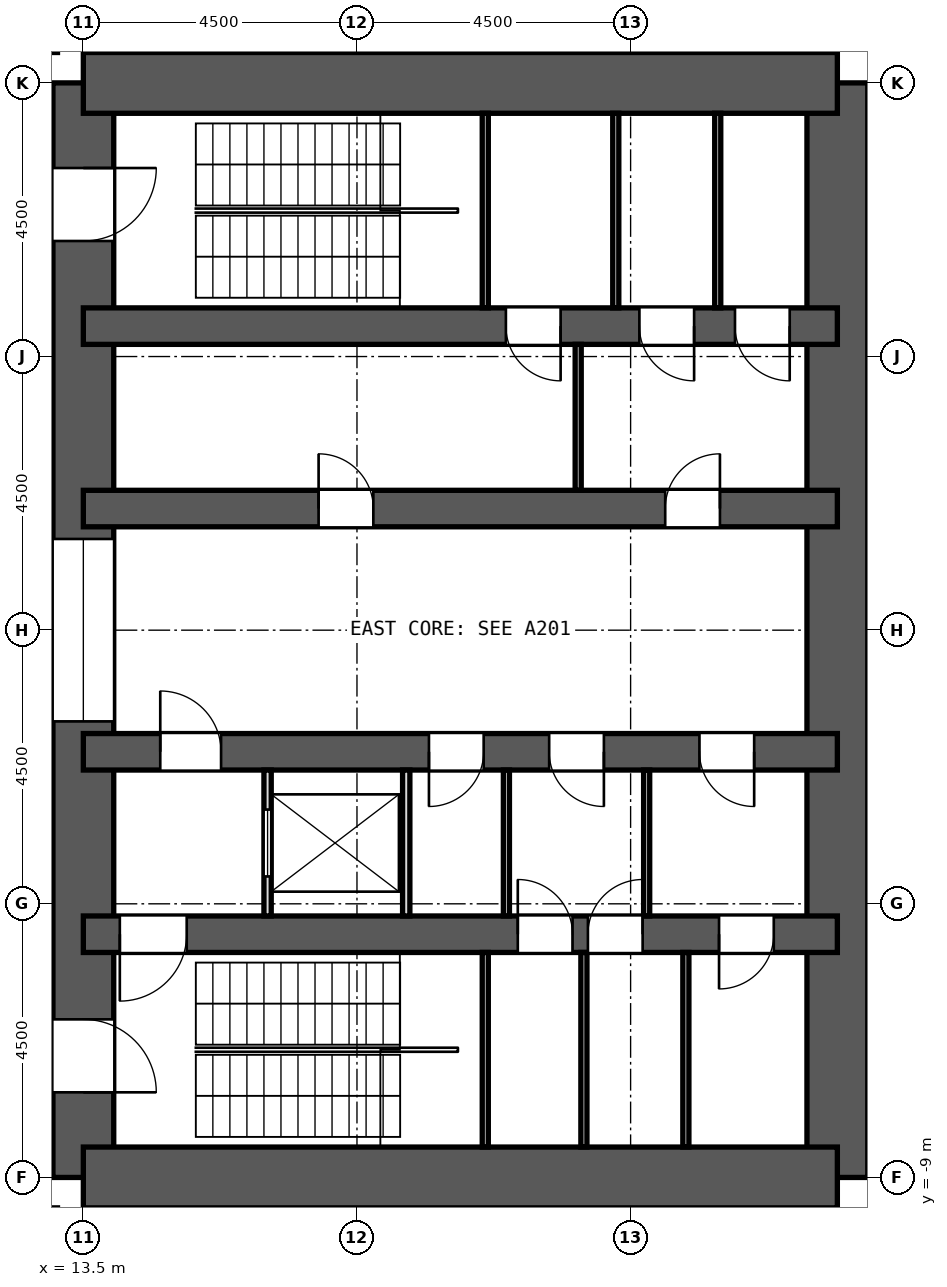
"""IFC4 building model, lengths in metres.
Left out: names, types, materials, properties, quantities, classifications, styles, units other than length and angle.
Written with IfcOpenShell. Run it as: python <this file> out.ifc"""

import sys

from ifc_helpers import new_model, si_unit, direction, frame, frame_2d, origin, place, context, subcontext, project, spatial, rectangle, extrude, element, fill, save


model = new_model("IFC4")
c1 = context("Model", 3, precision=1e-05, world=origin(), true_north=direction((0.0, 1.0)))
c2 = subcontext(c1, "Body", "Model", "MODEL_VIEW")
j1 = project(units=[si_unit("LENGTHUNIT", "METRE"), si_unit("PLANEANGLEUNIT", "RADIAN")], contexts=[c1])
p1 = place(None, origin())
s1 = spatial("IfcSite", under=j1, at=p1, CompositionType="ELEMENT")
p2 = place(p1, origin())
s2 = spatial("IfcBuilding", under=s1, at=p2, CompositionType="ELEMENT")
p3 = place(p2, frame((0.0, 0.0, -9.0)))
s3 = spatial("IfcBuildingStorey", under=s2, at=p3, CompositionType="ELEMENT", Elevation=-9.0)
p4 = place(p3, frame((13.5, -9.0, -0.3), z_axis=(0.0, 0.0, 1.0), x_axis=(0.0, 1.0, 0.0)))
e1 = element("IfcWall", 1, at=p4, inside=s3, PredefinedType="SHEAR", context=c2, shape_type="SweptSolid", body=[
    extrude(rectangle(XDim=18.0, YDim=1.0, at=frame_2d((9.0, 0.0))), origin(), (0.0, 0.0, 1.0), 4.8),
])
p5 = place(p4, frame((15.4, 0.0, 0.3)))
e2 = element("IfcOpeningElement", 2, at=p5, cuts=e1, PredefinedType="OPENING", context=c2, shape_type="SweptSolid", body=[
    extrude(rectangle(XDim=1.2, YDim=2.1, at=frame_2d((0.6, 1.05))), frame((0.0, 0.512, 0.0), z_axis=(0.0, -1.0, 0.0), x_axis=(1.0, 0.0, 0.0)), (0.0, 0.0, 1.0), 1.024),
])
p6 = place(p4, frame((1.4, 0.0, 0.3)))
e3 = element("IfcOpeningElement", 3, at=p6, cuts=e1, PredefinedType="OPENING", context=c2, shape_type="SweptSolid", body=[
    extrude(rectangle(XDim=1.2, YDim=2.1, at=frame_2d((0.6, 1.05))), frame((0.0, 0.512, 0.0), z_axis=(0.0, -1.0, 0.0), x_axis=(1.0, 0.0, 0.0)), (0.0, 0.0, 1.0), 1.024),
])
p7 = place(p4, frame((7.5, 0.0, 0.3)))
e4 = element("IfcOpeningElement", 4, at=p7, cuts=e1, PredefinedType="OPENING", context=c2, shape_type="SweptSolid", body=[
    extrude(rectangle(XDim=3.0, YDim=2.4, at=frame_2d((1.5, 1.2))), frame((0.0, 0.512, 0.0), z_axis=(0.0, -1.0, 0.0), x_axis=(1.0, 0.0, 0.0)), (0.0, 0.0, 1.0), 1.024),
])
p8 = place(p3, frame((25.9, -9.0, -0.3), z_axis=(0.0, 0.0, 1.0), x_axis=(0.0, 1.0, 0.0)))
e5 = element("IfcWall", 5, at=p8, inside=s3, PredefinedType="SHEAR", context=c2, shape_type="SweptSolid", body=[
    extrude(rectangle(XDim=18.0, YDim=1.0, at=frame_2d((9.0, 0.0))), origin(), (0.0, 0.0, 1.0), 4.8),
])
for number, where, z_axis, x_axis in (
    (6, (13.5, 9.0, -0.3), (0.0, 0.0, 1.0), (1.0, 0.0, 0.0)),
    (7, (13.5, -9.0, -0.3), (0.0, 0.0, 1.0), (1.0, 0.0, 0.0)),
):
    element("IfcWall", number, at=place(p3, frame(where, z_axis=z_axis, x_axis=x_axis)), inside=s3, PredefinedType="SHEAR", context=c2, shape_type="SweptSolid", body=[
        extrude(rectangle(XDim=12.4, YDim=1.0, at=frame_2d((6.2, 0.0))), origin(), (0.0, 0.0, 1.0), 4.8),
    ])
p9 = place(p3, frame((13.5, 5.0, -0.3), z_axis=(0.0, 0.0, 1.0), x_axis=(1.0, 0.0, 0.0)))
e8 = element("IfcWall", 8, at=p9, inside=s3, PredefinedType="SHEAR", context=c2, shape_type="SweptSolid", body=[
    extrude(rectangle(XDim=12.4, YDim=0.6, at=frame_2d((6.2, 0.0))), origin(), (0.0, 0.0, 1.0), 4.8),
])
p10 = place(p9, frame((6.949, 0.0, 0.3)))
e9 = element("IfcOpeningElement", 9, at=p10, cuts=e8, PredefinedType="OPENING", context=c2, shape_type="SweptSolid", body=[
    extrude(rectangle(XDim=0.9, YDim=2.1, at=frame_2d((0.45, 1.05))), frame((0.0, 0.312, 0.0), z_axis=(0.0, -1.0, 0.0), x_axis=(1.0, 0.0, 0.0)), (0.0, 0.0, 1.0), 0.624),
])
p11 = place(p9, frame((9.144, 0.0, 0.3)))
e10 = element("IfcOpeningElement", 10, at=p11, cuts=e8, PredefinedType="OPENING", context=c2, shape_type="SweptSolid", body=[
    extrude(rectangle(XDim=0.9, YDim=2.1, at=frame_2d((0.45, 1.05))), frame((0.0, 0.312, 0.0), z_axis=(0.0, -1.0, 0.0), x_axis=(1.0, 0.0, 0.0)), (0.0, 0.0, 1.0), 0.624),
])
p12 = place(p9, frame((10.716, 0.0, 0.3)))
e11 = element("IfcOpeningElement", 11, at=p12, cuts=e8, PredefinedType="OPENING", context=c2, shape_type="SweptSolid", body=[
    extrude(rectangle(XDim=0.9, YDim=2.1, at=frame_2d((0.45, 1.05))), frame((0.0, 0.312, 0.0), z_axis=(0.0, -1.0, 0.0), x_axis=(1.0, 0.0, 0.0)), (0.0, 0.0, 1.0), 0.624),
])
p13 = place(p3, frame((13.5, -5.0, -0.3), z_axis=(0.0, 0.0, 1.0), x_axis=(1.0, 0.0, 0.0)))
e12 = element("IfcWall", 12, at=p13, inside=s3, PredefinedType="SHEAR", context=c2, shape_type="SweptSolid", body=[
    extrude(rectangle(XDim=12.4, YDim=0.6, at=frame_2d((6.2, 0.0))), origin(), (0.0, 0.0, 1.0), 4.8),
])
p14 = place(p13, frame((7.145, 0.0, 0.3)))
e13 = element("IfcOpeningElement", 13, at=p14, cuts=e12, PredefinedType="OPENING", context=c2, shape_type="SweptSolid", body=[
    extrude(rectangle(XDim=0.9, YDim=2.1, at=frame_2d((0.45, 1.05))), frame((0.0, 0.312, 0.0), z_axis=(0.0, -1.0, 0.0), x_axis=(1.0, 0.0, 0.0)), (0.0, 0.0, 1.0), 0.624),
])
p15 = place(p13, frame((8.298, 0.0, 0.3)))
e14 = element("IfcOpeningElement", 14, at=p15, cuts=e12, PredefinedType="OPENING", context=c2, shape_type="SweptSolid", body=[
    extrude(rectangle(XDim=0.9, YDim=2.1, at=frame_2d((0.45, 1.05))), frame((0.0, 0.312, 0.0), z_axis=(0.0, -1.0, 0.0), x_axis=(1.0, 0.0, 0.0)), (0.0, 0.0, 1.0), 0.624),
])
p16 = place(p13, frame((10.454, 0.0, 0.3)))
e15 = element("IfcOpeningElement", 15, at=p16, cuts=e12, PredefinedType="OPENING", context=c2, shape_type="SweptSolid", body=[
    extrude(rectangle(XDim=0.9, YDim=2.1, at=frame_2d((0.45, 1.05))), frame((0.0, 0.312, 0.0), z_axis=(0.0, -1.0, 0.0), x_axis=(1.0, 0.0, 0.0)), (0.0, 0.0, 1.0), 0.624),
])
p17 = place(p13, frame((0.6, 0.0, 0.3)))
e16 = element("IfcOpeningElement", 16, at=p17, cuts=e12, PredefinedType="OPENING", context=c2, shape_type="SweptSolid", body=[
    extrude(rectangle(XDim=1.1, YDim=2.1, at=frame_2d((0.55, 1.05))), frame((0.0, 0.312, 0.0), z_axis=(0.0, -1.0, 0.0), x_axis=(1.0, 0.0, 0.0)), (0.0, 0.0, 1.0), 0.624),
])
p18 = place(p3, frame((13.5, 2.0, -0.3), z_axis=(0.0, 0.0, 1.0), x_axis=(1.0, 0.0, 0.0)))
e17 = element("IfcWall", 17, at=p18, inside=s3, PredefinedType="SHEAR", context=c2, shape_type="SweptSolid", body=[
    extrude(rectangle(XDim=12.4, YDim=0.6, at=frame_2d((6.2, 0.0))), origin(), (0.0, 0.0, 1.0), 4.8),
])
p19 = place(p18, frame((3.869, 0.0, 0.3)))
e18 = element("IfcOpeningElement", 18, at=p19, cuts=e17, PredefinedType="OPENING", context=c2, shape_type="SweptSolid", body=[
    extrude(rectangle(XDim=0.9, YDim=2.1, at=frame_2d((0.45, 1.05))), frame((0.0, 0.312, 0.0), z_axis=(0.0, -1.0, 0.0), x_axis=(1.0, 0.0, 0.0)), (0.0, 0.0, 1.0), 0.624),
])
p20 = place(p18, frame((9.569, 0.0, 0.3)))
e19 = element("IfcOpeningElement", 19, at=p20, cuts=e17, PredefinedType="OPENING", context=c2, shape_type="SweptSolid", body=[
    extrude(rectangle(XDim=0.9, YDim=2.1, at=frame_2d((0.45, 1.05))), frame((0.0, 0.312, 0.0), z_axis=(0.0, -1.0, 0.0), x_axis=(1.0, 0.0, 0.0)), (0.0, 0.0, 1.0), 0.624),
])
p21 = place(p3, frame((13.5, -2.0, -0.3), z_axis=(0.0, 0.0, 1.0), x_axis=(1.0, 0.0, 0.0)))
e20 = element("IfcWall", 20, at=p21, inside=s3, PredefinedType="SHEAR", context=c2, shape_type="SweptSolid", body=[
    extrude(rectangle(XDim=12.4, YDim=0.6, at=frame_2d((6.2, 0.0))), origin(), (0.0, 0.0, 1.0), 4.8),
])
p22 = place(p21, frame((1.265, 0.0, 0.3)))
e21 = element("IfcOpeningElement", 21, at=p22, cuts=e20, PredefinedType="OPENING", context=c2, shape_type="SweptSolid", body=[
    extrude(rectangle(XDim=1.0, YDim=2.1, at=frame_2d((0.5, 1.05))), frame((0.0, 0.312, 0.0), z_axis=(0.0, -1.0, 0.0), x_axis=(1.0, 0.0, 0.0)), (0.0, 0.0, 1.0), 0.624),
])
p23 = place(p21, frame((5.684, 0.0, 0.3)))
e22 = element("IfcOpeningElement", 22, at=p23, cuts=e20, PredefinedType="OPENING", context=c2, shape_type="SweptSolid", body=[
    extrude(rectangle(XDim=0.9, YDim=2.1, at=frame_2d((0.45, 1.05))), frame((0.0, 0.312, 0.0), z_axis=(0.0, -1.0, 0.0), x_axis=(1.0, 0.0, 0.0)), (0.0, 0.0, 1.0), 0.624),
])
p24 = place(p21, frame((7.661, 0.0, 0.3)))
e23 = element("IfcOpeningElement", 23, at=p24, cuts=e20, PredefinedType="OPENING", context=c2, shape_type="SweptSolid", body=[
    extrude(rectangle(XDim=0.9, YDim=2.1, at=frame_2d((0.45, 1.05))), frame((0.0, 0.312, 0.0), z_axis=(0.0, -1.0, 0.0), x_axis=(1.0, 0.0, 0.0)), (0.0, 0.0, 1.0), 0.624),
])
p25 = place(p21, frame((10.132, 0.0, 0.3)))
e24 = element("IfcOpeningElement", 24, at=p25, cuts=e20, PredefinedType="OPENING", context=c2, shape_type="SweptSolid", body=[
    extrude(rectangle(XDim=0.9, YDim=2.1, at=frame_2d((0.45, 1.05))), frame((0.0, 0.312, 0.0), z_axis=(0.0, -1.0, 0.0), x_axis=(1.0, 0.0, 0.0)), (0.0, 0.0, 1.0), 0.624),
])
p26 = place(p3, frame((9.077, -9.077, 0.0), z_axis=(0.0, 0.0, 1.0), x_axis=(0.707106781187, -0.707106781187, 0.0)))
e25 = element("IfcWall", 25, at=p26, inside=s3, PredefinedType="PARTITIONING", context=c2, shape_type="SweptSolid", body=[
    extrude(rectangle(XDim=14.703, YDim=0.15, at=frame_2d((7.352, 0.0))), origin(), (0.0, 0.0, 1.0), 3.95),
])
p27 = place(p26, frame((1.966, 0.0, 0.0)))
e26 = element("IfcOpeningElement", 26, at=p27, cuts=e25, PredefinedType="OPENING", context=c2, shape_type="SweptSolid", body=[
    extrude(rectangle(XDim=0.9, YDim=2.1, at=frame_2d((0.45, 1.05))), frame((0.0, 0.087, 0.0), z_axis=(0.0, -1.0, 0.0), x_axis=(1.0, 0.0, 0.0)), (0.0, 0.0, 1.0), 0.174),
])
p28 = place(p3, frame((9.13, 9.13, 0.0), z_axis=(0.0, 0.0, 1.0), x_axis=(0.707106781187, 0.707106781187, 0.0)))
e27 = element("IfcWall", 27, at=p28, inside=s3, PredefinedType="PARTITIONING", context=c2, shape_type="SweptSolid", body=[
    extrude(rectangle(XDim=14.628, YDim=0.15, at=frame_2d((7.314, 0.0))), origin(), (0.0, 0.0, 1.0), 3.95),
])
p29 = place(p28, frame((2.201, 0.0, 0.0)))
e28 = element("IfcOpeningElement", 28, at=p29, cuts=e27, PredefinedType="OPENING", context=c2, shape_type="SweptSolid", body=[
    extrude(rectangle(XDim=1.0, YDim=2.1, at=frame_2d((0.5, 1.05))), frame((0.0, 0.087, 0.0), z_axis=(0.0, -1.0, 0.0), x_axis=(1.0, 0.0, 0.0)), (0.0, 0.0, 1.0), 0.174),
])
p30 = place(p3, frame((13.0, 9.5, 0.0), z_axis=(0.0, 0.0, 1.0), x_axis=(0.0, 1.0, 0.0)))
e29 = element("IfcWall", 29, at=p30, inside=s3, PredefinedType="PARTITIONING", context=c2, shape_type="SweptSolid", body=[
    extrude(rectangle(XDim=3.425, YDim=0.15, at=frame_2d((1.712, 0.0))), origin(), (0.0, 0.0, 1.0), 3.95),
])
p31 = place(p30, frame((1.15, 0.0, 0.0)))
e30 = element("IfcOpeningElement", 30, at=p31, cuts=e29, PredefinedType="OPENING", context=c2, shape_type="SweptSolid", body=[
    extrude(rectangle(XDim=1.2, YDim=2.1, at=frame_2d((0.6, 1.05))), frame((0.0, 0.087, 0.0), z_axis=(0.0, -1.0, 0.0), x_axis=(1.0, 0.0, 0.0)), (0.0, 0.0, 1.0), 0.174),
])
p32 = place(p3, frame((21.638, 2.3, 0.0), z_axis=(0.0, 0.0, 1.0), x_axis=(0.0, 1.0, 0.0)))
e31 = element("IfcWall", 31, at=p32, inside=s3, PredefinedType="PARTITIONING", context=c2, shape_type="SweptSolid", body=[
    extrude(rectangle(XDim=2.4, YDim=0.1, at=frame_2d((1.2, 0.0))), origin(), (0.0, 0.0, 1.0), 3.95),
])
p33 = place(p3, frame((16.53, -4.7, 0.0), z_axis=(0.0, 0.0, 1.0), x_axis=(0.0, 1.0, 0.0)))
e32 = element("IfcWall", 32, at=p33, inside=s3, PredefinedType="PARTITIONING", context=c2, shape_type="SweptSolid", body=[
    extrude(rectangle(XDim=2.4, YDim=0.12, at=frame_2d((1.2, 0.0))), origin(), (0.0, 0.0, 1.0), 3.95),
])
p34 = place(p33, frame((0.65, 0.0, 0.0)))
e33 = element("IfcOpeningElement", 33, at=p34, cuts=e32, PredefinedType="OPENING", context=c2, shape_type="SweptSolid", body=[
    extrude(rectangle(XDim=1.1, YDim=2.1, at=frame_2d((0.55, 1.05))), frame((0.0, 0.072, 0.0), z_axis=(0.0, -1.0, 0.0), x_axis=(1.0, 0.0, 0.0)), (0.0, 0.0, 1.0), 0.144),
])
p35 = place(p3, frame((18.81, -4.7, 0.0), z_axis=(0.0, 0.0, 1.0), x_axis=(0.0, 1.0, 0.0)))
e34 = element("IfcWall", 34, at=p35, inside=s3, PredefinedType="PARTITIONING", context=c2, shape_type="SweptSolid", body=[
    extrude(rectangle(XDim=2.4, YDim=0.12, at=frame_2d((1.2, 0.0))), origin(), (0.0, 0.0, 1.0), 3.95),
])
for number, where, z_axis, x_axis in (
    (35, (20.458, -4.7, 0.0), (0.0, 0.0, 1.0), (0.0, 1.0, 0.0)),
    (36, (22.764, -4.7, 0.0), (0.0, 0.0, 1.0), (0.0, 1.0, 0.0)),
):
    element("IfcWall", number, at=place(p3, frame(where, z_axis=z_axis, x_axis=x_axis)), inside=s3, PredefinedType="PARTITIONING", context=c2, shape_type="SweptSolid", body=[
        extrude(rectangle(XDim=2.4, YDim=0.1, at=frame_2d((1.2, 0.0))), origin(), (0.0, 0.0, 1.0), 3.95),
    ])
for number, where, z_axis, x_axis in (
    (37, (20.11, 5.3, 0.0), (0.0, 0.0, 1.0), (0.0, 1.0, 0.0)),
    (38, (22.256, 5.3, 0.0), (0.0, 0.0, 1.0), (0.0, 1.0, 0.0)),
    (39, (23.933, 5.3, 0.0), (0.0, 0.0, 1.0), (0.0, 1.0, 0.0)),
    (40, (20.11, -8.5, 0.0), (0.0, 0.0, 1.0), (0.0, 1.0, 0.0)),
    (41, (21.732, -8.5, 0.0), (0.0, 0.0, 1.0), (0.0, 1.0, 0.0)),
    (42, (23.409, -8.5, 0.0), (0.0, 0.0, 1.0), (0.0, 1.0, 0.0)),
):
    element("IfcWall", number, at=place(p3, frame(where, z_axis=z_axis, x_axis=x_axis)), inside=s3, PredefinedType="PARTITIONING", context=c2, shape_type="SweptSolid", body=[
        extrude(rectangle(XDim=3.2, YDim=0.1, at=frame_2d((1.6, 0.0))), origin(), (0.0, 0.0, 1.0), 3.95),
    ])
p36 = place(p34, origin())
e43 = element("IfcDoor", 43, at=p36, inside=s3, OperationType="DOUBLE_DOOR_SLIDING", PredefinedType="DOOR", context=c2, shape_type="SweptSolid", body=[
    extrude(rectangle(XDim=1.1, YDim=2.1, at=frame_2d((0.55, 1.05))), frame((0.0, 0.025, 0.0), z_axis=(0.0, -1.0, 0.0), x_axis=(1.0, 0.0, 0.0)), (0.0, 0.0, 1.0), 0.05),
])
fill(e33, e43)
p37 = place(p19, origin())
e44 = element("IfcDoor", 44, at=p37, inside=s3, OperationType="SINGLE_SWING_LEFT", PredefinedType="DOOR", context=c2, shape_type="SweptSolid", body=[
    extrude(rectangle(XDim=0.9, YDim=2.1, at=frame_2d((0.45, 1.05))), frame((0.0, 0.025, 0.0), z_axis=(0.0, -1.0, 0.0), x_axis=(1.0, 0.0, 0.0)), (0.0, 0.0, 1.0), 0.05),
])
fill(e18, e44)
p38 = place(p20, origin())
e45 = element("IfcDoor", 45, at=p38, inside=s3, OperationType="SINGLE_SWING_RIGHT", PredefinedType="DOOR", context=c2, shape_type="SweptSolid", body=[
    extrude(rectangle(XDim=0.9, YDim=2.1, at=frame_2d((0.45, 1.05))), frame((0.0, 0.025, 0.0), z_axis=(0.0, -1.0, 0.0), x_axis=(1.0, 0.0, 0.0)), (0.0, 0.0, 1.0), 0.05),
])
fill(e19, e45)
p39 = place(p22, origin())
e46 = element("IfcDoor", 46, at=p39, inside=s3, OperationType="SINGLE_SWING_LEFT", PredefinedType="DOOR", context=c2, shape_type="SweptSolid", body=[
    extrude(rectangle(XDim=1.0, YDim=2.1, at=frame_2d((0.5, 1.05))), frame((0.0, 0.025, 0.0), z_axis=(0.0, -1.0, 0.0), x_axis=(1.0, 0.0, 0.0)), (0.0, 0.0, 1.0), 0.05),
])
fill(e21, e46)
p40 = place(p23, frame((0.9, 0.0, 0.0), z_axis=(0.0, 0.0, 1.0), x_axis=(-1.0, 0.0, 0.0)))
e47 = element("IfcDoor", 47, at=p40, inside=s3, OperationType="SINGLE_SWING_RIGHT", PredefinedType="DOOR", context=c2, shape_type="SweptSolid", body=[
    extrude(rectangle(XDim=0.9, YDim=2.1, at=frame_2d((0.45, 1.05))), frame((0.0, 0.025, 0.0), z_axis=(0.0, -1.0, 0.0), x_axis=(1.0, 0.0, 0.0)), (0.0, 0.0, 1.0), 0.05),
])
fill(e22, e47)
p41 = place(p24, frame((0.9, 0.0, 0.0), z_axis=(0.0, 0.0, 1.0), x_axis=(-1.0, 0.0, 0.0)))
e48 = element("IfcDoor", 48, at=p41, inside=s3, OperationType="SINGLE_SWING_LEFT", PredefinedType="DOOR", context=c2, shape_type="SweptSolid", body=[
    extrude(rectangle(XDim=0.9, YDim=2.1, at=frame_2d((0.45, 1.05))), frame((0.0, 0.025, 0.0), z_axis=(0.0, -1.0, 0.0), x_axis=(1.0, 0.0, 0.0)), (0.0, 0.0, 1.0), 0.05),
])
fill(e23, e48)
p42 = place(p25, frame((0.9, 0.0, 0.0), z_axis=(0.0, 0.0, 1.0), x_axis=(-1.0, 0.0, 0.0)))
e49 = element("IfcDoor", 49, at=p42, inside=s3, OperationType="SINGLE_SWING_LEFT", PredefinedType="DOOR", context=c2, shape_type="SweptSolid", body=[
    extrude(rectangle(XDim=0.9, YDim=2.1, at=frame_2d((0.45, 1.05))), frame((0.0, 0.025, 0.0), z_axis=(0.0, -1.0, 0.0), x_axis=(1.0, 0.0, 0.0)), (0.0, 0.0, 1.0), 0.05),
])
fill(e24, e49)
p43 = place(p10, frame((0.9, 0.0, 0.0), z_axis=(0.0, 0.0, 1.0), x_axis=(-1.0, 0.0, 0.0)))
e50 = element("IfcDoor", 50, at=p43, inside=s3, OperationType="SINGLE_SWING_LEFT", PredefinedType="DOOR", context=c2, shape_type="SweptSolid", body=[
    extrude(rectangle(XDim=0.9, YDim=2.1, at=frame_2d((0.45, 1.05))), frame((0.0, 0.025, 0.0), z_axis=(0.0, -1.0, 0.0), x_axis=(1.0, 0.0, 0.0)), (0.0, 0.0, 1.0), 0.05),
])
fill(e9, e50)
p44 = place(p11, frame((0.9, 0.0, 0.0), z_axis=(0.0, 0.0, 1.0), x_axis=(-1.0, 0.0, 0.0)))
e51 = element("IfcDoor", 51, at=p44, inside=s3, OperationType="SINGLE_SWING_LEFT", PredefinedType="DOOR", context=c2, shape_type="SweptSolid", body=[
    extrude(rectangle(XDim=0.9, YDim=2.1, at=frame_2d((0.45, 1.05))), frame((0.0, 0.025, 0.0), z_axis=(0.0, -1.0, 0.0), x_axis=(1.0, 0.0, 0.0)), (0.0, 0.0, 1.0), 0.05),
])
fill(e10, e51)
p45 = place(p12, frame((0.9, 0.0, 0.0), z_axis=(0.0, 0.0, 1.0), x_axis=(-1.0, 0.0, 0.0)))
e52 = element("IfcDoor", 52, at=p45, inside=s3, OperationType="SINGLE_SWING_LEFT", PredefinedType="DOOR", context=c2, shape_type="SweptSolid", body=[
    extrude(rectangle(XDim=0.9, YDim=2.1, at=frame_2d((0.45, 1.05))), frame((0.0, 0.025, 0.0), z_axis=(0.0, -1.0, 0.0), x_axis=(1.0, 0.0, 0.0)), (0.0, 0.0, 1.0), 0.05),
])
fill(e11, e52)
p46 = place(p14, origin())
e53 = element("IfcDoor", 53, at=p46, inside=s3, OperationType="SINGLE_SWING_LEFT", PredefinedType="DOOR", context=c2, shape_type="SweptSolid", body=[
    extrude(rectangle(XDim=0.9, YDim=2.1, at=frame_2d((0.45, 1.05))), frame((0.0, 0.025, 0.0), z_axis=(0.0, -1.0, 0.0), x_axis=(1.0, 0.0, 0.0)), (0.0, 0.0, 1.0), 0.05),
])
fill(e13, e53)
p47 = place(p15, origin())
e54 = element("IfcDoor", 54, at=p47, inside=s3, OperationType="SINGLE_SWING_RIGHT", PredefinedType="DOOR", context=c2, shape_type="SweptSolid", body=[
    extrude(rectangle(XDim=0.9, YDim=2.1, at=frame_2d((0.45, 1.05))), frame((0.0, 0.025, 0.0), z_axis=(0.0, -1.0, 0.0), x_axis=(1.0, 0.0, 0.0)), (0.0, 0.0, 1.0), 0.05),
])
fill(e14, e54)
p48 = place(p16, frame((0.9, 0.0, 0.0), z_axis=(0.0, 0.0, 1.0), x_axis=(-1.0, 0.0, 0.0)))
e55 = element("IfcDoor", 55, at=p48, inside=s3, OperationType="SINGLE_SWING_RIGHT", PredefinedType="DOOR", context=c2, shape_type="SweptSolid", body=[
    extrude(rectangle(XDim=0.9, YDim=2.1, at=frame_2d((0.45, 1.05))), frame((0.0, 0.025, 0.0), z_axis=(0.0, -1.0, 0.0), x_axis=(1.0, 0.0, 0.0)), (0.0, 0.0, 1.0), 0.05),
])
fill(e15, e55)
p49 = place(p17, frame((1.1, 0.0, 0.0), z_axis=(0.0, 0.0, 1.0), x_axis=(-1.0, 0.0, 0.0)))
e56 = element("IfcDoor", 56, at=p49, inside=s3, OperationType="SINGLE_SWING_RIGHT", PredefinedType="DOOR", context=c2, shape_type="SweptSolid", body=[
    extrude(rectangle(XDim=1.1, YDim=2.1, at=frame_2d((0.55, 1.05))), frame((0.0, 0.025, 0.0), z_axis=(0.0, -1.0, 0.0), x_axis=(1.0, 0.0, 0.0)), (0.0, 0.0, 1.0), 0.05),
])
fill(e16, e56)
p50 = place(p5, frame((1.2, 0.0, 0.0), z_axis=(0.0, 0.0, 1.0), x_axis=(-1.0, 0.0, 0.0)))
e57 = element("IfcDoor", 57, at=p50, inside=s3, OperationType="SINGLE_SWING_LEFT", PredefinedType="DOOR", context=c2, shape_type="SweptSolid", body=[
    extrude(rectangle(XDim=1.2, YDim=2.1, at=frame_2d((0.6, 1.05))), frame((0.0, 0.025, 0.0), z_axis=(0.0, -1.0, 0.0), x_axis=(1.0, 0.0, 0.0)), (0.0, 0.0, 1.0), 0.05),
])
fill(e2, e57)
p51 = place(p6, frame((1.2, 0.0, 0.0), z_axis=(0.0, 0.0, 1.0), x_axis=(-1.0, 0.0, 0.0)))
e58 = element("IfcDoor", 58, at=p51, inside=s3, OperationType="SINGLE_SWING_RIGHT", PredefinedType="DOOR", context=c2, shape_type="SweptSolid", body=[
    extrude(rectangle(XDim=1.2, YDim=2.1, at=frame_2d((0.6, 1.05))), frame((0.0, 0.025, 0.0), z_axis=(0.0, -1.0, 0.0), x_axis=(1.0, 0.0, 0.0)), (0.0, 0.0, 1.0), 0.05),
])
fill(e3, e58)
p52 = place(p7, origin())
e59 = element("IfcDoor", 59, at=p52, inside=s3, OperationType="DOUBLE_DOOR_SLIDING", PredefinedType="DOOR", context=c2, shape_type="SweptSolid", body=[
    extrude(rectangle(XDim=3.0, YDim=2.4, at=frame_2d((1.5, 1.2))), frame((0.0, 0.025, 0.0), z_axis=(0.0, -1.0, 0.0), x_axis=(1.0, 0.0, 0.0)), (0.0, 0.0, 1.0), 0.05),
])
fill(e4, e59)
save(model, sys.argv[1])
